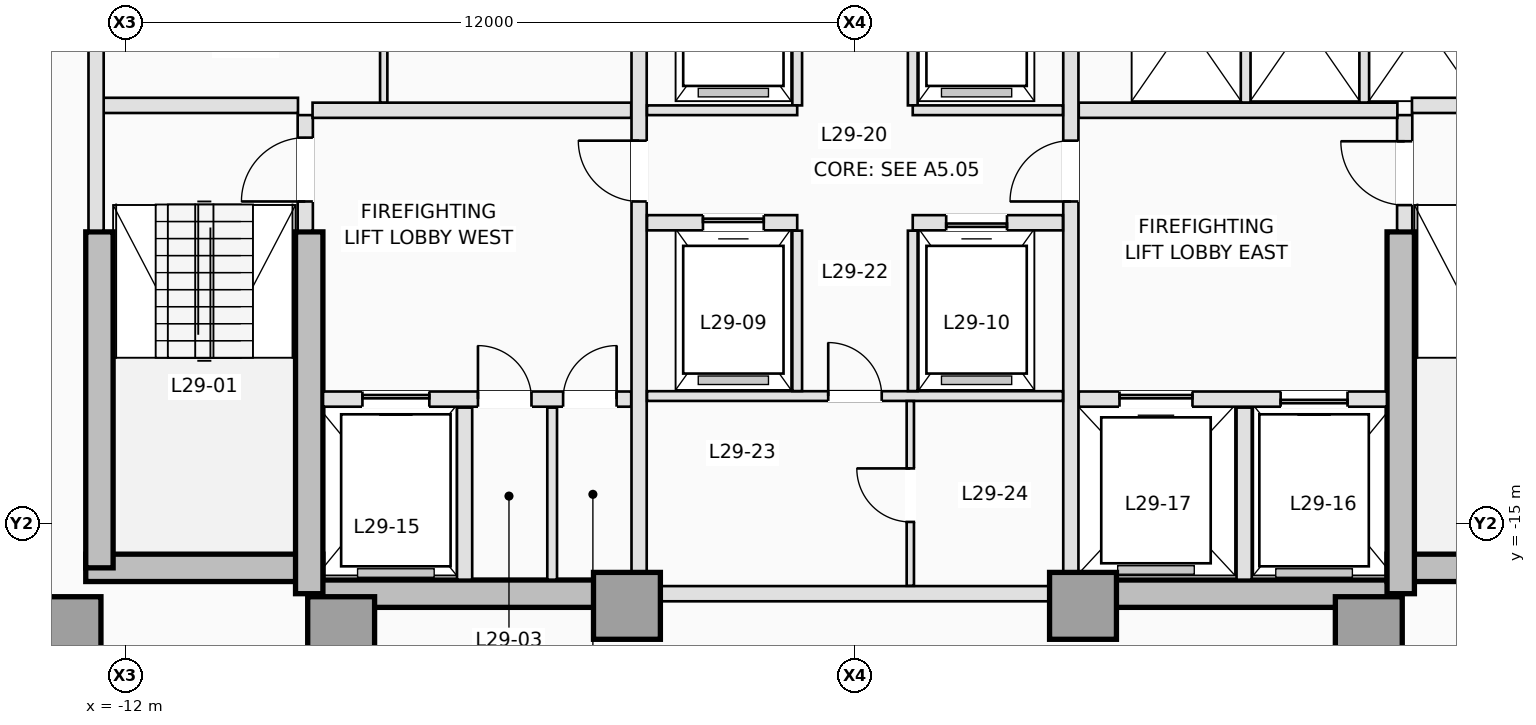
"""IFC4 building model, lengths in metres.
Left out: names, types, materials, properties, quantities, classifications, styles, units other than length and angle.
Written with IfcOpenShell. Run it as: python <this file> out.ifc"""

import sys

from ifc_helpers import new_model, si_unit, direction, frame, frame_2d, origin, origin_2d, place, context, subcontext, project, spatial, rectangle, extrude, element, fill, save


model = new_model("IFC4")
c1 = context("Model", 3, precision=1e-05, world=origin(), true_north=direction((0.0, 1.0)))
c2 = subcontext(c1, "Body", "Model", "MODEL_VIEW")
j1 = project(units=[si_unit("LENGTHUNIT", "METRE"), si_unit("PLANEANGLEUNIT", "RADIAN")], contexts=[c1])
p1 = place(None, origin())
s1 = spatial("IfcSite", under=j1, at=p1, CompositionType="ELEMENT")
p2 = place(p1, origin())
s2 = spatial("IfcBuilding", under=s1, at=p2, CompositionType="ELEMENT")
p3 = place(p2, frame((0.0, 0.0, 109.0)))
s3 = spatial("IfcBuildingStorey", under=s2, at=p3, CompositionType="ELEMENT", Elevation=109.0)
p4 = place(p3, frame((-12.65, -15.725, 0.0), z_axis=(0.0, 0.0, 1.0), x_axis=(1.0, 0.0, 0.0)))
e1 = element("IfcWall", 1, at=p4, inside=s3, PredefinedType="SHEAR", context=c2, shape_type="SweptSolid", body=[
    extrude(rectangle(XDim=3.9, YDim=0.45, at=frame_2d((1.95, 0.0))), origin(), (0.0, 0.0, 1.0), 3.5),
])
for number, where, z_axis, x_axis in (
    (2, (-8.975, -16.15, 0.0), (0.0, 0.0, 1.0), (1.0, 0.0, 0.0)),
    (3, (3.75, -16.15, 0.0), (0.0, 0.0, 1.0), (1.0, 0.0, 0.0)),
):
    element("IfcWall", number, at=place(p3, frame(where, z_axis=z_axis, x_axis=x_axis)), inside=s3, PredefinedType="SHEAR", context=c2, shape_type="SweptSolid", body=[
        extrude(rectangle(XDim=5.225, YDim=0.45, at=frame_2d((2.613, 0.0))), origin(), (0.0, 0.0, 1.0), 3.5),
    ])
p5 = place(p3, frame((8.75, -15.725, 0.0), z_axis=(0.0, 0.0, 1.0), x_axis=(1.0, 0.0, 0.0)))
e4 = element("IfcWall", 4, at=p5, inside=s3, PredefinedType="SHEAR", context=c2, shape_type="SweptSolid", body=[
    extrude(rectangle(XDim=3.9, YDim=0.45, at=frame_2d((1.95, 0.0))), origin(), (0.0, 0.0, 1.0), 3.5),
])
p6 = place(p3, frame((-12.425, -15.725, 0.0), z_axis=(0.0, 0.0, 1.0), x_axis=(0.0, 1.0, 0.0)))
e5 = element("IfcWall", 5, at=p6, inside=s3, PredefinedType="SHEAR", context=c2, shape_type="SweptSolid", body=[
    extrude(rectangle(XDim=5.525, YDim=0.45, at=frame_2d((2.763, 0.0))), origin(), (0.0, 0.0, 1.0), 3.5),
])
for number, where, z_axis, x_axis in (
    (6, (-8.975, -16.15, 0.0), (0.0, 0.0, 1.0), (0.0, 1.0, 0.0)),
    (7, (8.975, -16.15, 0.0), (0.0, 0.0, 1.0), (0.0, 1.0, 0.0)),
):
    element("IfcWall", number, at=place(p3, frame(where, z_axis=z_axis, x_axis=x_axis)), inside=s3, PredefinedType="SHEAR", context=c2, shape_type="SweptSolid", body=[
        extrude(rectangle(XDim=5.95, YDim=0.45, at=frame_2d((2.975, 0.0))), origin(), (0.0, 0.0, 1.0), 3.5),
    ])
for number, where, z_axis, x_axis in (
    (8, (-12.95, -16.75, 0.0), (0.0, 0.0, 1.0), (1.0, 0.0, 0.0)),
    (9, (-8.45, -16.75, 0.0), (0.0, 0.0, 1.0), (1.0, 0.0, 0.0)),
    (10, (-3.75, -16.35, 0.0), (0.0, 0.0, 1.0), (1.0, 0.0, 0.0)),
    (11, (3.75, -16.35, 0.0), (0.0, 0.0, 1.0), (1.0, 0.0, 0.0)),
    (12, (8.45, -16.75, 0.0), (0.0, 0.0, 1.0), (1.0, 0.0, 0.0)),
):
    element("IfcColumn", number, at=place(p3, frame(where, z_axis=z_axis, x_axis=x_axis)), inside=s3, PredefinedType="COLUMN", context=c2, shape_type="SweptSolid", body=[
        extrude(rectangle(XDim=1.1, YDim=1.1, at=origin_2d()), origin(), (0.0, 0.0, 1.0), 3.5),
    ])
p7 = place(p3, frame((-9.04, -10.18, 0.0), z_axis=(0.0, 0.0, 1.0), x_axis=(0.0, 1.0, 0.0)))
e13 = element("IfcWall", 13, at=p7, inside=s3, PredefinedType="PARTITIONING", context=c2, shape_type="SweptSolid", body=[
    extrude(rectangle(XDim=1.9, YDim=0.25, at=frame_2d((0.95, 0.0))), origin(), (0.0, 0.0, 1.0), 3.25),
])
p8 = place(p7, frame((0.48, 0.0, 0.0)))
e14 = element("IfcOpeningElement", 14, at=p8, cuts=e13, PredefinedType="OPENING", context=c2, shape_type="SweptSolid", body=[
    extrude(rectangle(XDim=1.05, YDim=2.15, at=frame_2d((0.525, 1.075))), frame((0.0, 0.135, 0.0), z_axis=(0.0, -1.0, 0.0), x_axis=(1.0, 0.0, 0.0)), (0.0, 0.0, 1.0), 0.27),
])
p9 = place(p3, frame((9.04, -10.18, 0.0), z_axis=(0.0, 0.0, 1.0), x_axis=(0.0, 1.0, 0.0)))
e15 = element("IfcWall", 15, at=p9, inside=s3, PredefinedType="PARTITIONING", context=c2, shape_type="SweptSolid", body=[
    extrude(rectangle(XDim=1.9, YDim=0.25, at=frame_2d((0.95, 0.0))), origin(), (0.0, 0.0, 1.0), 3.25),
])
p10 = place(p9, frame((0.42, 0.0, 0.0)))
e16 = element("IfcOpeningElement", 16, at=p10, cuts=e15, PredefinedType="OPENING", context=c2, shape_type="SweptSolid", body=[
    extrude(rectangle(XDim=1.05, YDim=2.15, at=frame_2d((0.525, 1.075))), frame((0.0, 0.135, 0.0), z_axis=(0.0, -1.0, 0.0), x_axis=(1.0, 0.0, 0.0)), (0.0, 0.0, 1.0), 0.27),
])
for number, where, z_axis, x_axis in (
    (17, (-12.38, -8.12, 0.0), (0.0, 0.0, 1.0), (1.0, 0.0, 0.0)),
    (18, (9.16, -8.12, 0.0), (0.0, 0.0, 1.0), (1.0, 0.0, 0.0)),
):
    element("IfcWall", number, at=place(p3, frame(where, z_axis=z_axis, x_axis=x_axis)), inside=s3, PredefinedType="PARTITIONING", context=c2, shape_type="SweptSolid", body=[
        extrude(rectangle(XDim=3.22, YDim=0.25, at=frame_2d((1.61, 0.0))), origin(), (0.0, 0.0, 1.0), 3.25),
    ])
p11 = place(p3, frame((-12.48, -10.18, 0.0), z_axis=(0.0, 0.0, 1.0), x_axis=(0.0, 1.0, 0.0)))
e19 = element("IfcWall", 19, at=p11, inside=s3, PredefinedType="PARTITIONING", context=c2, shape_type="SweptSolid", body=[
    extrude(rectangle(XDim=4.828, YDim=0.25, at=frame_2d((2.414, 0.0))), origin(), (0.0, 0.0, 1.0), 3.25),
])
p12 = place(p3, frame((-8.748, -12.95, 0.0), z_axis=(0.0, 0.0, 1.0), x_axis=(1.0, 0.0, 0.0)))
e20 = element("IfcWall", 20, at=p12, inside=s3, PredefinedType="PARTITIONING", context=c2, shape_type="SweptSolid", body=[
    extrude(rectangle(XDim=5.068, YDim=0.25, at=frame_2d((2.534, 0.0))), origin(), (0.0, 0.0, 1.0), 3.25),
])
p13 = place(p12, frame((0.648, 0.0, 0.0)))
e21 = element("IfcOpeningElement", 21, at=p13, cuts=e20, PredefinedType="OPENING", context=c2, shape_type="SweptSolid", body=[
    extrude(rectangle(XDim=1.1, YDim=2.15, at=frame_2d((0.55, 1.075))), frame((0.0, 0.135, 0.0), z_axis=(0.0, -1.0, 0.0), x_axis=(1.0, 0.0, 0.0)), (0.0, 0.0, 1.0), 0.27),
])
p14 = place(p12, frame((2.548, 0.0, 0.0)))
e22 = element("IfcOpeningElement", 22, at=p14, cuts=e20, PredefinedType="OPENING", context=c2, shape_type="SweptSolid", body=[
    extrude(rectangle(XDim=0.88, YDim=2.1, at=frame_2d((0.44, 1.05))), frame((0.0, 0.135, 0.0), z_axis=(0.0, -1.0, 0.0), x_axis=(1.0, 0.0, 0.0)), (0.0, 0.0, 1.0), 0.27),
])
p15 = place(p12, frame((3.948, 0.0, 0.0)))
e23 = element("IfcOpeningElement", 23, at=p15, cuts=e20, PredefinedType="OPENING", context=c2, shape_type="SweptSolid", body=[
    extrude(rectangle(XDim=0.88, YDim=2.1, at=frame_2d((0.44, 1.05))), frame((0.0, 0.135, 0.0), z_axis=(0.0, -1.0, 0.0), x_axis=(1.0, 0.0, 0.0)), (0.0, 0.0, 1.0), 0.27),
])
p16 = place(p3, frame((3.68, -12.95, 0.0), z_axis=(0.0, 0.0, 1.0), x_axis=(1.0, 0.0, 0.0)))
e24 = element("IfcWall", 24, at=p16, inside=s3, PredefinedType="PARTITIONING", context=c2, shape_type="SweptSolid", body=[
    extrude(rectangle(XDim=5.068, YDim=0.25, at=frame_2d((2.534, 0.0))), origin(), (0.0, 0.0, 1.0), 3.25),
])
p17 = place(p16, frame((3.32, 0.0, 0.0)))
e25 = element("IfcOpeningElement", 25, at=p17, cuts=e24, PredefinedType="OPENING", context=c2, shape_type="SweptSolid", body=[
    extrude(rectangle(XDim=1.1, YDim=2.15, at=frame_2d((0.55, 1.075))), frame((0.0, 0.135, 0.0), z_axis=(0.0, -1.0, 0.0), x_axis=(1.0, 0.0, 0.0)), (0.0, 0.0, 1.0), 0.27),
])
p18 = place(p16, frame((0.67, 0.0, 0.0)))
e26 = element("IfcOpeningElement", 26, at=p18, cuts=e24, PredefinedType="OPENING", context=c2, shape_type="SweptSolid", body=[
    extrude(rectangle(XDim=1.2, YDim=2.15, at=frame_2d((0.6, 1.075))), frame((0.0, 0.135, 0.0), z_axis=(0.0, -1.0, 0.0), x_axis=(1.0, 0.0, 0.0)), (0.0, 0.0, 1.0), 0.27),
])
p19 = place(p3, frame((-6.42, -15.92, 0.0), z_axis=(0.0, 0.0, 1.0), x_axis=(0.0, 1.0, 0.0)))
e27 = element("IfcWall", 27, at=p19, inside=s3, PredefinedType="PARTITIONING", context=c2, shape_type="SweptSolid", body=[
    extrude(rectangle(XDim=2.83, YDim=0.25, at=frame_2d((1.415, 0.0))), origin(), (0.0, 0.0, 1.0), 3.25),
])
p20 = place(p3, frame((-4.98, -15.92, 0.0), z_axis=(0.0, 0.0, 1.0), x_axis=(0.0, 1.0, 0.0)))
e28 = element("IfcWall", 28, at=p20, inside=s3, PredefinedType="PARTITIONING", context=c2, shape_type="SweptSolid", body=[
    extrude(rectangle(XDim=2.83, YDim=0.16, at=frame_2d((1.415, 0.0))), origin(), (0.0, 0.0, 1.0), 3.25),
])
p21 = place(p3, frame((6.4, -15.92, 0.0), z_axis=(0.0, 0.0, 1.0), x_axis=(0.0, 1.0, 0.0)))
e29 = element("IfcWall", 29, at=p21, inside=s3, PredefinedType="PARTITIONING", context=c2, shape_type="SweptSolid", body=[
    extrude(rectangle(XDim=2.83, YDim=0.25, at=frame_2d((1.415, 0.0))), origin(), (0.0, 0.0, 1.0), 3.25),
])
for number, where, z_axis, x_axis in (
    (30, (-8.92, -8.2, 0.0), (0.0, 0.0, 1.0), (1.0, 0.0, 0.0)),
    (31, (3.68, -8.2, 0.0), (0.0, 0.0, 1.0), (1.0, 0.0, 0.0)),
):
    element("IfcWall", number, at=place(p3, frame(where, z_axis=z_axis, x_axis=x_axis)), inside=s3, PredefinedType="PARTITIONING", context=c2, shape_type="SweptSolid", body=[
        extrude(rectangle(XDim=5.24, YDim=0.25, at=frame_2d((2.62, 0.0))), origin(), (0.0, 0.0, 1.0), 3.25),
    ])
p22 = place(p3, frame((-3.55, -15.798, 0.0), z_axis=(0.0, 0.0, 1.0), x_axis=(0.0, 1.0, 0.0)))
e32 = element("IfcWall", 32, at=p22, inside=s3, PredefinedType="PARTITIONING", context=c2, shape_type="SweptSolid", body=[
    extrude(rectangle(XDim=10.446, YDim=0.25, at=frame_2d((5.223, 0.0))), origin(), (0.0, 0.0, 1.0), 3.25),
])
p23 = place(p22, frame((6.098, 0.0, 0.0)))
e33 = element("IfcOpeningElement", 33, at=p23, cuts=e32, PredefinedType="OPENING", context=c2, shape_type="SweptSolid", body=[
    extrude(rectangle(XDim=1.0, YDim=2.15, at=frame_2d((0.5, 1.075))), frame((0.0, 0.135, 0.0), z_axis=(0.0, -1.0, 0.0), x_axis=(1.0, 0.0, 0.0)), (0.0, 0.0, 1.0), 0.27),
])
p24 = place(p3, frame((3.55, -15.798, 0.0), z_axis=(0.0, 0.0, 1.0), x_axis=(0.0, 1.0, 0.0)))
e34 = element("IfcWall", 34, at=p24, inside=s3, PredefinedType="PARTITIONING", context=c2, shape_type="SweptSolid", body=[
    extrude(rectangle(XDim=10.446, YDim=0.25, at=frame_2d((5.223, 0.0))), origin(), (0.0, 0.0, 1.0), 3.25),
])
p25 = place(p24, frame((6.098, 0.0, 0.0)))
e35 = element("IfcOpeningElement", 35, at=p25, cuts=e34, PredefinedType="OPENING", context=c2, shape_type="SweptSolid", body=[
    extrude(rectangle(XDim=1.0, YDim=2.15, at=frame_2d((0.5, 1.075))), frame((0.0, 0.135, 0.0), z_axis=(0.0, -1.0, 0.0), x_axis=(1.0, 0.0, 0.0)), (0.0, 0.0, 1.0), 0.27),
])
p26 = place(p3, frame((-7.75, -8.073, 0.0), z_axis=(0.0, 0.0, 1.0), x_axis=(0.0, 1.0, 0.0)))
e36 = element("IfcWall", 36, at=p26, inside=s3, PredefinedType="PARTITIONING", context=c2, shape_type="SweptSolid", body=[
    extrude(rectangle(XDim=2.733, YDim=0.12, at=frame_2d((1.366, 0.0))), origin(), (0.0, 0.0, 1.0), 3.25),
])
for number, where, z_axis, x_axis in (
    (37, (6.425, -8.073, 0.0), (0.0, 0.0, 1.0), (0.0, 1.0, 0.0)),
    (38, (8.375, -8.073, 0.0), (0.0, 0.0, 1.0), (0.0, 1.0, 0.0)),
):
    element("IfcWall", number, at=place(p3, frame(where, z_axis=z_axis, x_axis=x_axis)), inside=s3, PredefinedType="PARTITIONING", context=c2, shape_type="SweptSolid", body=[
        extrude(rectangle(XDim=2.733, YDim=0.16, at=frame_2d((1.366, 0.0))), origin(), (0.0, 0.0, 1.0), 3.25),
    ])
p27 = place(p3, frame((-3.198, -16.15, 0.0), z_axis=(0.0, 0.0, 1.0), x_axis=(1.0, 0.0, 0.0)))
e39 = element("IfcWall", 39, at=p27, inside=s3, PredefinedType="PARTITIONING", context=c2, shape_type="SweptSolid", body=[
    extrude(rectangle(XDim=6.396, YDim=0.25, at=frame_2d((3.198, 0.0))), origin(), (0.0, 0.0, 1.0), 2.3),
])
for number, where, z_axis, x_axis in (
    (40, (-0.95, -8.12, 0.0), (0.0, 0.0, 1.0), (0.0, 1.0, 0.0)),
    (41, (0.95, -8.12, 0.0), (0.0, 0.0, 1.0), (0.0, 1.0, 0.0)),
):
    element("IfcWall", number, at=place(p3, frame(where, z_axis=z_axis, x_axis=x_axis)), inside=s3, PredefinedType="PARTITIONING", context=c2, shape_type="SweptSolid", body=[
        extrude(rectangle(XDim=2.78, YDim=0.16, at=frame_2d((1.39, 0.0))), origin(), (0.0, 0.0, 1.0), 3.25),
    ])
for number, where, z_axis, x_axis in (
    (42, (-3.42, -8.2, 0.0), (0.0, 0.0, 1.0), (1.0, 0.0, 0.0)),
    (43, (0.95, -8.2, 0.0), (0.0, 0.0, 1.0), (1.0, 0.0, 0.0)),
):
    element("IfcWall", number, at=place(p3, frame(where, z_axis=z_axis, x_axis=x_axis)), inside=s3, PredefinedType="PARTITIONING", context=c2, shape_type="SweptSolid", body=[
        extrude(rectangle(XDim=2.47, YDim=0.16, at=frame_2d((1.235, 0.0))), origin(), (0.0, 0.0, 1.0), 3.25),
    ])
p28 = place(p3, frame((-3.42, -10.05, 0.0), z_axis=(0.0, 0.0, 1.0), x_axis=(1.0, 0.0, 0.0)))
e44 = element("IfcWall", 44, at=p28, inside=s3, PredefinedType="PARTITIONING", context=c2, shape_type="SweptSolid", body=[
    extrude(rectangle(XDim=2.47, YDim=0.25, at=frame_2d((1.235, 0.0))), origin(), (0.0, 0.0, 1.0), 3.25),
])
p29 = place(p28, frame((0.92, 0.0, 0.0)))
e45 = element("IfcOpeningElement", 45, at=p29, cuts=e44, PredefinedType="OPENING", context=c2, shape_type="SweptSolid", body=[
    extrude(rectangle(XDim=1.0, YDim=2.15, at=frame_2d((0.5, 1.075))), frame((0.0, 0.135, 0.0), z_axis=(0.0, -1.0, 0.0), x_axis=(1.0, 0.0, 0.0)), (0.0, 0.0, 1.0), 0.27),
])
p30 = place(p3, frame((0.95, -10.05, 0.0), z_axis=(0.0, 0.0, 1.0), x_axis=(1.0, 0.0, 0.0)))
e46 = element("IfcWall", 46, at=p30, inside=s3, PredefinedType="PARTITIONING", context=c2, shape_type="SweptSolid", body=[
    extrude(rectangle(XDim=2.47, YDim=0.25, at=frame_2d((1.235, 0.0))), origin(), (0.0, 0.0, 1.0), 3.25),
])
p31 = place(p30, frame((0.55, 0.0, 0.0)))
e47 = element("IfcOpeningElement", 47, at=p31, cuts=e46, PredefinedType="OPENING", context=c2, shape_type="SweptSolid", body=[
    extrude(rectangle(XDim=1.0, YDim=2.15, at=frame_2d((0.5, 1.075))), frame((0.0, 0.135, 0.0), z_axis=(0.0, -1.0, 0.0), x_axis=(1.0, 0.0, 0.0)), (0.0, 0.0, 1.0), 0.27),
])
p32 = place(p3, frame((-3.42, -12.9, 0.0), z_axis=(0.0, 0.0, 1.0), x_axis=(1.0, 0.0, 0.0)))
e48 = element("IfcWall", 48, at=p32, inside=s3, PredefinedType="PARTITIONING", context=c2, shape_type="SweptSolid", body=[
    extrude(rectangle(XDim=6.84, YDim=0.16, at=frame_2d((3.42, 0.0))), origin(), (0.0, 0.0, 1.0), 3.25),
])
p33 = place(p32, frame((2.98, 0.0, 0.0)))
e49 = element("IfcOpeningElement", 49, at=p33, cuts=e48, PredefinedType="OPENING", context=c2, shape_type="SweptSolid", body=[
    extrude(rectangle(XDim=0.88, YDim=2.12, at=frame_2d((0.44, 1.06))), frame((0.0, 0.09, 0.0), z_axis=(0.0, -1.0, 0.0), x_axis=(1.0, 0.0, 0.0)), (0.0, 0.0, 1.0), 0.18),
])
for number, where, z_axis, x_axis in (
    (50, (-0.95, -12.818, 0.0), (0.0, 0.0, 1.0), (0.0, 1.0, 0.0)),
    (51, (0.95, -12.818, 0.0), (0.0, 0.0, 1.0), (0.0, 1.0, 0.0)),
):
    element("IfcWall", number, at=place(p3, frame(where, z_axis=z_axis, x_axis=x_axis)), inside=s3, PredefinedType="PARTITIONING", context=c2, shape_type="SweptSolid", body=[
        extrude(rectangle(XDim=2.638, YDim=0.16, at=frame_2d((1.319, 0.0))), origin(), (0.0, 0.0, 1.0), 3.25),
    ])
p34 = place(p3, frame((0.91, -16.02, 0.0), z_axis=(0.0, 0.0, 1.0), x_axis=(0.0, 1.0, 0.0)))
e52 = element("IfcWall", 52, at=p34, inside=s3, PredefinedType="PARTITIONING", context=c2, shape_type="SweptSolid", body=[
    extrude(rectangle(XDim=3.038, YDim=0.12, at=frame_2d((1.519, 0.0))), origin(), (0.0, 0.0, 1.0), 3.25),
])
p35 = place(p34, frame((1.05, 0.0, 0.0)))
e53 = element("IfcOpeningElement", 53, at=p35, cuts=e52, PredefinedType="OPENING", context=c2, shape_type="SweptSolid", body=[
    extrude(rectangle(XDim=0.88, YDim=2.12, at=frame_2d((0.44, 1.06))), frame((0.0, 0.07, 0.0), z_axis=(0.0, -1.0, 0.0), x_axis=(1.0, 0.0, 0.0)), (0.0, 0.0, 1.0), 0.14),
])
p36 = place(p13, origin())
e54 = element("IfcDoor", 54, at=p36, inside=s3, OperationType="SLIDING_TO_LEFT", PredefinedType="DOOR", context=c2, shape_type="SweptSolid", body=[
    extrude(rectangle(XDim=1.1, YDim=2.15, at=frame_2d((0.55, 1.075))), frame((0.0, 0.025, 0.0), z_axis=(0.0, -1.0, 0.0), x_axis=(1.0, 0.0, 0.0)), (0.0, 0.0, 1.0), 0.05),
])
fill(e21, e54)
p37 = place(p17, origin())
e55 = element("IfcDoor", 55, at=p37, inside=s3, OperationType="SLIDING_TO_RIGHT", PredefinedType="DOOR", context=c2, shape_type="SweptSolid", body=[
    extrude(rectangle(XDim=1.1, YDim=2.15, at=frame_2d((0.55, 1.075))), frame((0.0, 0.025, 0.0), z_axis=(0.0, -1.0, 0.0), x_axis=(1.0, 0.0, 0.0)), (0.0, 0.0, 1.0), 0.05),
])
fill(e25, e55)
p38 = place(p18, origin())
e56 = element("IfcDoor", 56, at=p38, inside=s3, OperationType="SLIDING_TO_LEFT", PredefinedType="DOOR", context=c2, shape_type="SweptSolid", body=[
    extrude(rectangle(XDim=1.2, YDim=2.15, at=frame_2d((0.6, 1.075))), frame((0.0, 0.025, 0.0), z_axis=(0.0, -1.0, 0.0), x_axis=(1.0, 0.0, 0.0)), (0.0, 0.0, 1.0), 0.05),
])
fill(e26, e56)
p39 = place(p29, origin())
e57 = element("IfcDoor", 57, at=p39, inside=s3, OperationType="SLIDING_TO_LEFT", PredefinedType="DOOR", context=c2, shape_type="SweptSolid", body=[
    extrude(rectangle(XDim=1.0, YDim=2.15, at=frame_2d((0.5, 1.075))), frame((0.0, 0.025, 0.0), z_axis=(0.0, -1.0, 0.0), x_axis=(1.0, 0.0, 0.0)), (0.0, 0.0, 1.0), 0.05),
])
fill(e45, e57)
p40 = place(p31, origin())
e58 = element("IfcDoor", 58, at=p40, inside=s3, OperationType="SLIDING_TO_RIGHT", PredefinedType="DOOR", context=c2, shape_type="SweptSolid", body=[
    extrude(rectangle(XDim=1.0, YDim=2.15, at=frame_2d((0.5, 1.075))), frame((0.0, 0.025, 0.0), z_axis=(0.0, -1.0, 0.0), x_axis=(1.0, 0.0, 0.0)), (0.0, 0.0, 1.0), 0.05),
])
fill(e47, e58)
p41 = place(p8, origin())
e59 = element("IfcDoor", 59, at=p41, inside=s3, OperationType="SINGLE_SWING_LEFT", PredefinedType="DOOR", context=c2, shape_type="SweptSolid", body=[
    extrude(rectangle(XDim=1.05, YDim=2.15, at=frame_2d((0.525, 1.075))), frame((0.0, 0.025, 0.0), z_axis=(0.0, -1.0, 0.0), x_axis=(1.0, 0.0, 0.0)), (0.0, 0.0, 1.0), 0.05),
])
fill(e14, e59)
p42 = place(p10, origin())
e60 = element("IfcDoor", 60, at=p42, inside=s3, OperationType="SINGLE_SWING_RIGHT", PredefinedType="DOOR", context=c2, shape_type="SweptSolid", body=[
    extrude(rectangle(XDim=1.05, YDim=2.15, at=frame_2d((0.525, 1.075))), frame((0.0, 0.025, 0.0), z_axis=(0.0, -1.0, 0.0), x_axis=(1.0, 0.0, 0.0)), (0.0, 0.0, 1.0), 0.05),
])
fill(e16, e60)
p43 = place(p14, origin())
e61 = element("IfcDoor", 61, at=p43, inside=s3, OperationType="SINGLE_SWING_LEFT", PredefinedType="TRAPDOOR", context=c2, shape_type="SweptSolid", body=[
    extrude(rectangle(XDim=0.88, YDim=2.1, at=frame_2d((0.44, 1.05))), frame((0.0, 0.025, 0.0), z_axis=(0.0, -1.0, 0.0), x_axis=(1.0, 0.0, 0.0)), (0.0, 0.0, 1.0), 0.05),
])
fill(e22, e61)
p44 = place(p15, origin())
e62 = element("IfcDoor", 62, at=p44, inside=s3, OperationType="SINGLE_SWING_RIGHT", PredefinedType="TRAPDOOR", context=c2, shape_type="SweptSolid", body=[
    extrude(rectangle(XDim=0.88, YDim=2.1, at=frame_2d((0.44, 1.05))), frame((0.0, 0.025, 0.0), z_axis=(0.0, -1.0, 0.0), x_axis=(1.0, 0.0, 0.0)), (0.0, 0.0, 1.0), 0.05),
])
fill(e23, e62)
p45 = place(p23, origin())
e63 = element("IfcDoor", 63, at=p45, inside=s3, OperationType="SINGLE_SWING_RIGHT", PredefinedType="DOOR", context=c2, shape_type="SweptSolid", body=[
    extrude(rectangle(XDim=1.0, YDim=2.15, at=frame_2d((0.5, 1.075))), frame((0.0, 0.025, 0.0), z_axis=(0.0, -1.0, 0.0), x_axis=(1.0, 0.0, 0.0)), (0.0, 0.0, 1.0), 0.05),
])
fill(e33, e63)
p46 = place(p25, origin())
e64 = element("IfcDoor", 64, at=p46, inside=s3, OperationType="SINGLE_SWING_LEFT", PredefinedType="DOOR", context=c2, shape_type="SweptSolid", body=[
    extrude(rectangle(XDim=1.0, YDim=2.15, at=frame_2d((0.5, 1.075))), frame((0.0, 0.025, 0.0), z_axis=(0.0, -1.0, 0.0), x_axis=(1.0, 0.0, 0.0)), (0.0, 0.0, 1.0), 0.05),
])
fill(e35, e64)
p47 = place(p33, origin())
e65 = element("IfcDoor", 65, at=p47, inside=s3, OperationType="SINGLE_SWING_LEFT", PredefinedType="DOOR", context=c2, shape_type="SweptSolid", body=[
    extrude(rectangle(XDim=0.88, YDim=2.12, at=frame_2d((0.44, 1.06))), frame((0.0, 0.025, 0.0), z_axis=(0.0, -1.0, 0.0), x_axis=(1.0, 0.0, 0.0)), (0.0, 0.0, 1.0), 0.05),
])
fill(e49, e65)
p48 = place(p35, origin())
e66 = element("IfcDoor", 66, at=p48, inside=s3, OperationType="SINGLE_SWING_RIGHT", PredefinedType="DOOR", context=c2, shape_type="SweptSolid", body=[
    extrude(rectangle(XDim=0.88, YDim=2.12, at=frame_2d((0.44, 1.06))), frame((0.0, 0.025, 0.0), z_axis=(0.0, -1.0, 0.0), x_axis=(1.0, 0.0, 0.0)), (0.0, 0.0, 1.0), 0.05),
])
fill(e53, e66)
save(model, sys.argv[1])
